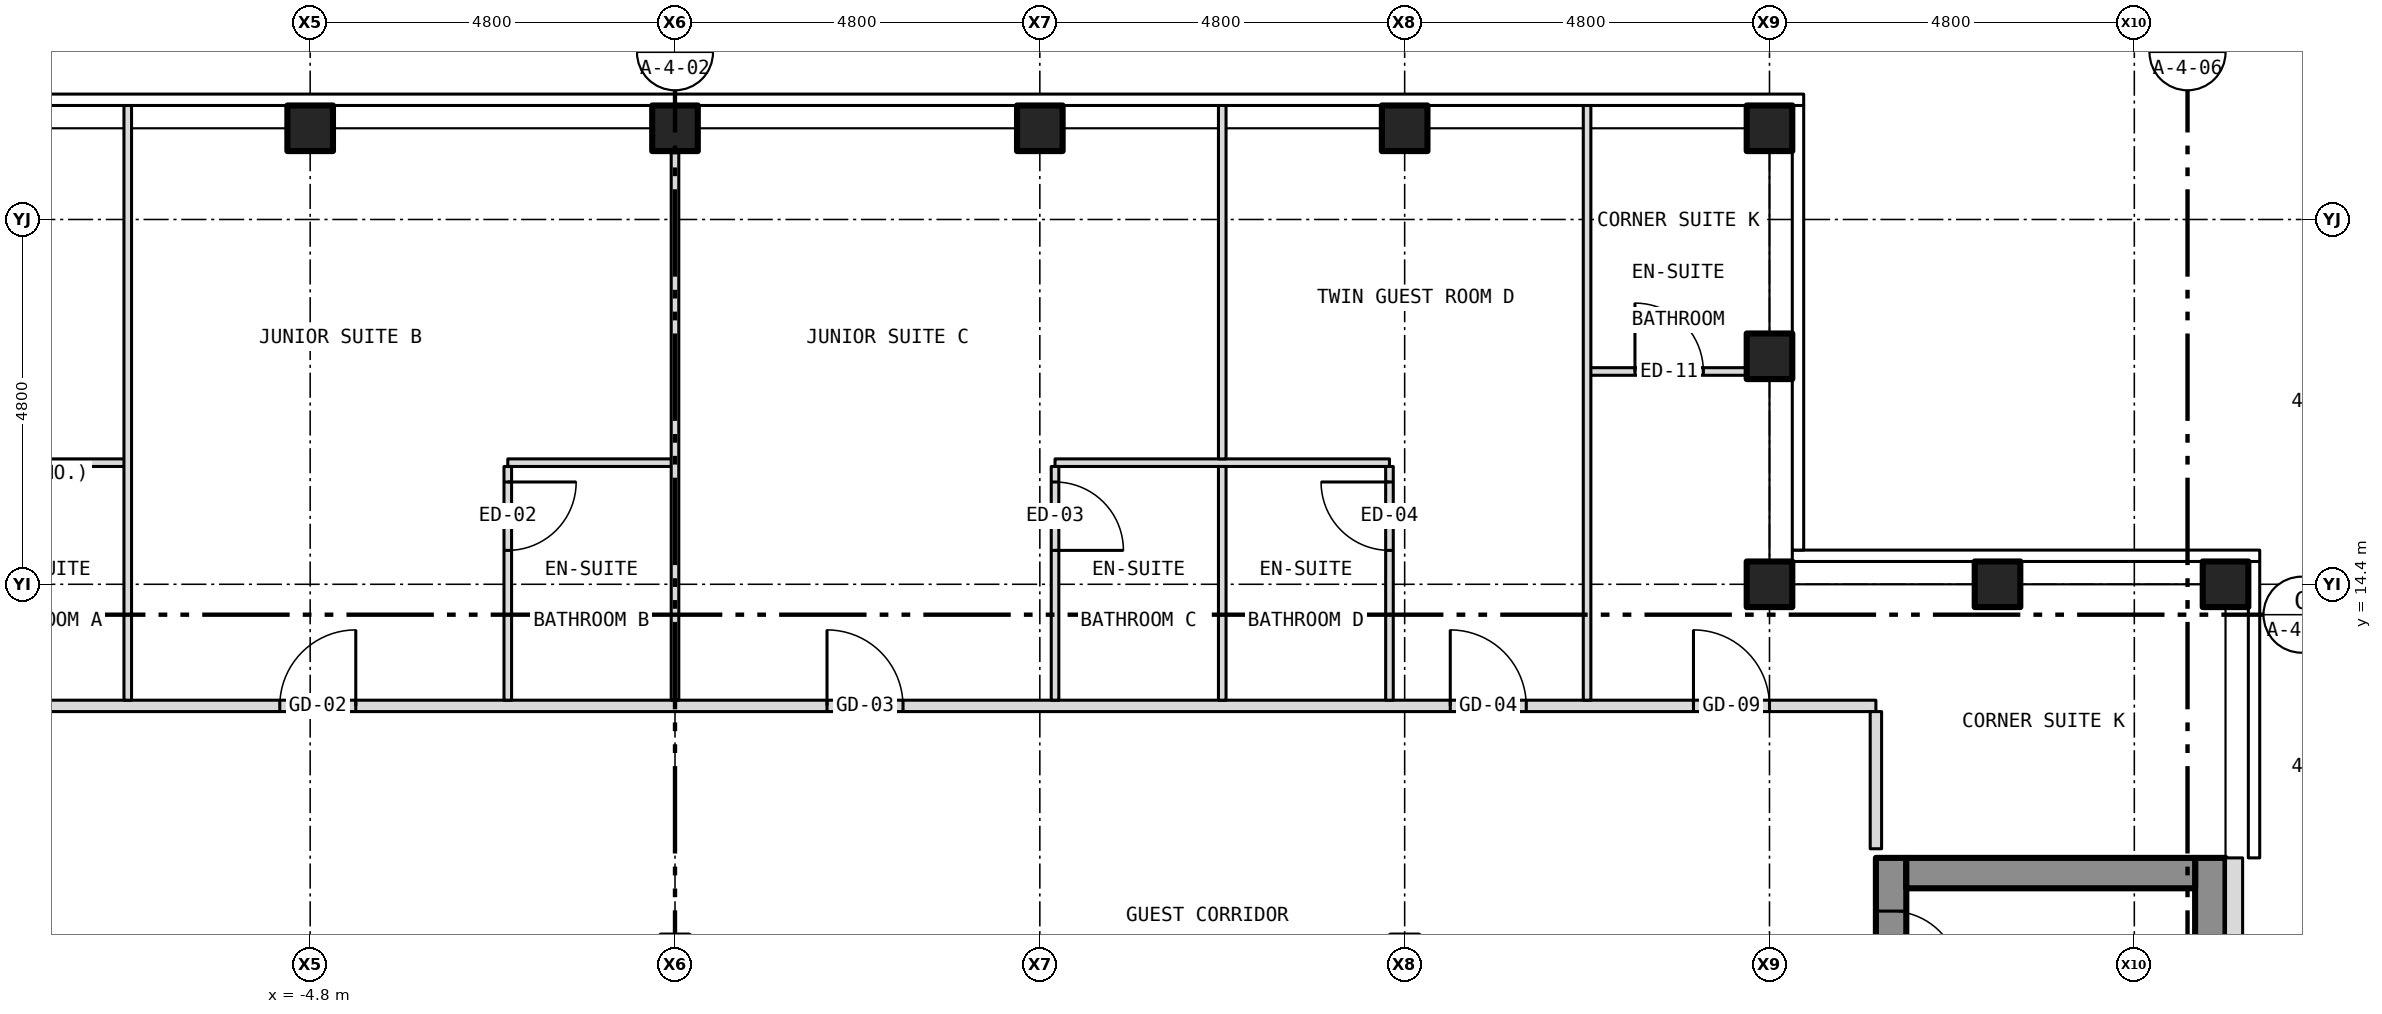
"""IFC4 building model, lengths in metres.
Left out: names, types, materials, properties, quantities, classifications, styles, units other than length and angle.
Written with IfcOpenShell. Run it as: python <this file> out.ifc"""

import sys

from ifc_helpers import new_model, si_unit, direction, frame, frame_2d, origin, origin_2d, place, context, subcontext, project, spatial, rectangle, hollow_rectangle, extrude, element, fill, save


model = new_model("IFC4")
c1 = context("Model", 3, precision=1e-05, world=origin(), true_north=direction((0.0, 1.0)))
c2 = subcontext(c1, "Body", "Model", "MODEL_VIEW")
j1 = project(units=[si_unit("LENGTHUNIT", "METRE"), si_unit("PLANEANGLEUNIT", "RADIAN")], contexts=[c1])
p1 = place(None, origin())
s1 = spatial("IfcSite", under=j1, at=p1, CompositionType="ELEMENT")
p2 = place(p1, origin())
s2 = spatial("IfcBuilding", under=s1, at=p2, CompositionType="ELEMENT")
p3 = place(p2, frame((0.0, 0.0, 258.5)))
s3 = spatial("IfcBuildingStorey", under=s2, at=p3, CompositionType="ELEMENT", Elevation=258.5)
for number, where, z_axis, x_axis in (
    (1, (-4.8, 20.4, -0.15), (0.0, 0.0, 1.0), (1.0, 0.0, 0.0)),
    (2, (0.0, 20.4, -0.15), (0.0, 0.0, 1.0), (1.0, 0.0, 0.0)),
    (3, (4.8, 20.4, -0.15), (0.0, 0.0, 1.0), (1.0, 0.0, 0.0)),
    (4, (9.6, 20.4, -0.15), (0.0, 0.0, 1.0), (1.0, 0.0, 0.0)),
    (5, (14.4, 20.4, -0.15), (0.0, 0.0, 1.0), (1.0, 0.0, 0.0)),
    (6, (20.4, 14.4, -0.15), (0.0, 0.0, 1.0), (1.0, 0.0, 0.0)),
    (7, (14.4, 14.4, -0.15), (0.0, 0.0, 1.0), (1.0, 0.0, 0.0)),
    (8, (14.4, 17.4, -0.15), (0.0, 0.0, 1.0), (1.0, 0.0, 0.0)),
    (9, (17.4, 14.4, -0.15), (0.0, 0.0, 1.0), (1.0, 0.0, 0.0)),
):
    element("IfcColumn", number, at=place(p3, frame(where, z_axis=z_axis, x_axis=x_axis)), inside=s3, PredefinedType="COLUMN", context=c2, shape_type="SweptSolid", body=[
        extrude(hollow_rectangle(XDim=0.6, YDim=0.6, WallThickness=0.03, at=origin_2d()), origin(), (0.0, 0.0, 1.0), 3.5),
    ])
p4 = place(p3, frame((16.0, -10.8, 0.0), z_axis=(0.0, 0.0, 1.0), x_axis=(0.0, 1.0, 0.0)))
e10 = element("IfcWall", 10, at=p4, inside=s3, PredefinedType="SHEAR", context=c2, shape_type="SweptSolid", body=[
    extrude(rectangle(XDim=21.6, YDim=0.4, at=frame_2d((10.8, 0.0))), origin(), (0.0, 0.0, 1.0), 3.25),
])
p5 = place(p4, frame((9.4, 0.0, 0.0)))
e11 = element("IfcOpeningElement", 11, at=p5, cuts=e10, PredefinedType="OPENING", context=c2, shape_type="SweptSolid", body=[
    extrude(rectangle(XDim=1.1, YDim=2.1, at=frame_2d((0.55, 1.05))), frame((0.0, 0.212, 0.0), z_axis=(0.0, -1.0, 0.0), x_axis=(1.0, 0.0, 0.0)), (0.0, 0.0, 1.0), 0.424),
])
p6 = place(p4, frame((11.5, 0.0, 0.0)))
e12 = element("IfcOpeningElement", 12, at=p6, cuts=e10, PredefinedType="OPENING", context=c2, shape_type="SweptSolid", body=[
    extrude(rectangle(XDim=1.1, YDim=2.1, at=frame_2d((0.55, 1.05))), frame((0.0, 0.212, 0.0), z_axis=(0.0, -1.0, 0.0), x_axis=(1.0, 0.0, 0.0)), (0.0, 0.0, 1.0), 0.424),
])
p7 = place(p4, frame((13.6, 0.0, 0.0)))
e13 = element("IfcOpeningElement", 13, at=p7, cuts=e10, PredefinedType="OPENING", context=c2, shape_type="SweptSolid", body=[
    extrude(rectangle(XDim=1.1, YDim=2.1, at=frame_2d((0.55, 1.05))), frame((0.0, 0.212, 0.0), z_axis=(0.0, -1.0, 0.0), x_axis=(1.0, 0.0, 0.0)), (0.0, 0.0, 1.0), 0.424),
])
p8 = place(p4, frame((15.7, 0.0, 0.0)))
e14 = element("IfcOpeningElement", 14, at=p8, cuts=e10, PredefinedType="OPENING", context=c2, shape_type="SweptSolid", body=[
    extrude(rectangle(XDim=1.1, YDim=2.1, at=frame_2d((0.55, 1.05))), frame((0.0, 0.212, 0.0), z_axis=(0.0, -1.0, 0.0), x_axis=(1.0, 0.0, 0.0)), (0.0, 0.0, 1.0), 0.424),
])
p9 = place(p4, frame((17.8, 0.0, 0.0)))
e15 = element("IfcOpeningElement", 15, at=p9, cuts=e10, PredefinedType="OPENING", context=c2, shape_type="SweptSolid", body=[
    extrude(rectangle(XDim=1.1, YDim=2.1, at=frame_2d((0.55, 1.05))), frame((0.0, 0.212, 0.0), z_axis=(0.0, -1.0, 0.0), x_axis=(1.0, 0.0, 0.0)), (0.0, 0.0, 1.0), 0.424),
])
p10 = place(p4, frame((5.642, 0.0, 0.0)))
e16 = element("IfcOpeningElement", 16, at=p10, cuts=e10, PredefinedType="OPENING", context=c2, shape_type="SweptSolid", body=[
    extrude(rectangle(XDim=1.1, YDim=2.1, at=frame_2d((0.55, 1.05))), frame((0.0, 0.212, 0.0), z_axis=(0.0, -1.0, 0.0), x_axis=(1.0, 0.0, 0.0)), (0.0, 0.0, 1.0), 0.424),
])
p11 = place(p4, frame((7.5, 0.0, 0.0)))
e17 = element("IfcOpeningElement", 17, at=p11, cuts=e10, PredefinedType="OPENING", context=c2, shape_type="SweptSolid", body=[
    extrude(rectangle(XDim=1.1, YDim=2.1, at=frame_2d((0.55, 1.05))), frame((0.0, 0.212, 0.0), z_axis=(0.0, -1.0, 0.0), x_axis=(1.0, 0.0, 0.0)), (0.0, 0.0, 1.0), 0.424),
])
p12 = place(p4, frame((20.0, 0.0, 0.0)))
e18 = element("IfcOpeningElement", 18, at=p12, cuts=e10, PredefinedType="OPENING", context=c2, shape_type="SweptSolid", body=[
    extrude(rectangle(XDim=0.9, YDim=2.1, at=frame_2d((0.45, 1.05))), frame((0.0, 0.212, 0.0), z_axis=(0.0, -1.0, 0.0), x_axis=(1.0, 0.0, 0.0)), (0.0, 0.0, 1.0), 0.424),
])
p13 = place(p3, frame((20.2, -10.8, 0.0), z_axis=(0.0, 0.0, 1.0), x_axis=(0.0, 1.0, 0.0)))
e19 = element("IfcWall", 19, at=p13, inside=s3, PredefinedType="SHEAR", context=c2, shape_type="SweptSolid", body=[
    extrude(rectangle(XDim=21.6, YDim=0.4, at=frame_2d((10.8, 0.0))), origin(), (0.0, 0.0, 1.0), 3.25),
])
p14 = place(p3, frame((16.2, 10.6, 0.0), z_axis=(0.0, 0.0, 1.0), x_axis=(1.0, 0.0, 0.0)))
e20 = element("IfcWall", 20, at=p14, inside=s3, PredefinedType="SHEAR", context=c2, shape_type="SweptSolid", body=[
    extrude(rectangle(XDim=3.8, YDim=0.4, at=frame_2d((1.9, 0.0))), origin(), (0.0, 0.0, 1.0), 3.25),
])
p15 = place(p3, frame((20.512, -10.8, 0.0), z_axis=(0.0, 0.0, 1.0), x_axis=(0.0, 1.0, 0.0)))
e21 = element("IfcWall", 21, at=p15, inside=s3, PredefinedType="SOLIDWALL", context=c2, shape_type="SweptSolid", body=[
    extrude(rectangle(XDim=21.6, YDim=0.225, at=frame_2d((10.8, 0.0))), origin(), (0.0, 0.0, 1.0), 3.5),
])
p16 = place(p15, frame((2.95, 0.0, 1.0)))
e22 = element("IfcOpeningElement", 22, at=p16, cuts=e21, PredefinedType="OPENING", context=c2, shape_type="SweptSolid", body=[
    extrude(rectangle(XDim=0.6, YDim=1.5, at=frame_2d((0.3, 0.75))), frame((0.0, 0.125, 0.0), z_axis=(0.0, -1.0, 0.0), x_axis=(1.0, 0.0, 0.0)), (0.0, 0.0, 1.0), 0.249),
])
p17 = place(p3, frame((-15.8, 12.8, 0.0), z_axis=(0.0, 0.0, 1.0), x_axis=(1.0, 0.0, 0.0)))
e23 = element("IfcWall", 23, at=p17, inside=s3, PredefinedType="PARTITIONING", context=c2, shape_type="SweptSolid", body=[
    extrude(rectangle(XDim=31.6, YDim=0.15, at=frame_2d((15.8, 0.0))), origin(), (0.0, 0.0, 1.0), 3.35),
])
p18 = place(p17, frame((4.6, 0.0, 0.0)))
e24 = element("IfcOpeningElement", 24, at=p18, cuts=e23, PredefinedType="OPENING", context=c2, shape_type="SweptSolid", body=[
    extrude(rectangle(XDim=1.0, YDim=2.1, at=frame_2d((0.5, 1.05))), frame((0.0, 0.087, 0.0), z_axis=(0.0, -1.0, 0.0), x_axis=(1.0, 0.0, 0.0)), (0.0, 0.0, 1.0), 0.174),
])
p19 = place(p17, frame((10.6, 0.0, 0.0)))
e25 = element("IfcOpeningElement", 25, at=p19, cuts=e23, PredefinedType="OPENING", context=c2, shape_type="SweptSolid", body=[
    extrude(rectangle(XDim=1.0, YDim=2.1, at=frame_2d((0.5, 1.05))), frame((0.0, 0.087, 0.0), z_axis=(0.0, -1.0, 0.0), x_axis=(1.0, 0.0, 0.0)), (0.0, 0.0, 1.0), 0.174),
])
p20 = place(p17, frame((17.8, 0.0, 0.0)))
e26 = element("IfcOpeningElement", 26, at=p20, cuts=e23, PredefinedType="OPENING", context=c2, shape_type="SweptSolid", body=[
    extrude(rectangle(XDim=1.0, YDim=2.1, at=frame_2d((0.5, 1.05))), frame((0.0, 0.087, 0.0), z_axis=(0.0, -1.0, 0.0), x_axis=(1.0, 0.0, 0.0)), (0.0, 0.0, 1.0), 0.174),
])
p21 = place(p17, frame((26.0, 0.0, 0.0)))
e27 = element("IfcOpeningElement", 27, at=p21, cuts=e23, PredefinedType="OPENING", context=c2, shape_type="SweptSolid", body=[
    extrude(rectangle(XDim=1.0, YDim=2.1, at=frame_2d((0.5, 1.05))), frame((0.0, 0.087, 0.0), z_axis=(0.0, -1.0, 0.0), x_axis=(1.0, 0.0, 0.0)), (0.0, 0.0, 1.0), 0.174),
])
p22 = place(p17, frame((1.4, 0.0, 0.0)))
e28 = element("IfcOpeningElement", 28, at=p22, cuts=e23, PredefinedType="OPENING", context=c2, shape_type="SweptSolid", body=[
    extrude(rectangle(XDim=1.0, YDim=2.1, at=frame_2d((0.5, 1.05))), frame((0.0, 0.087, 0.0), z_axis=(0.0, -1.0, 0.0), x_axis=(1.0, 0.0, 0.0)), (0.0, 0.0, 1.0), 0.174),
])
p23 = place(p17, frame((29.2, 0.0, 0.0)))
e29 = element("IfcOpeningElement", 29, at=p23, cuts=e23, PredefinedType="OPENING", context=c2, shape_type="SweptSolid", body=[
    extrude(rectangle(XDim=1.0, YDim=2.1, at=frame_2d((0.5, 1.05))), frame((0.0, 0.087, 0.0), z_axis=(0.0, -1.0, 0.0), x_axis=(1.0, 0.0, 0.0)), (0.0, 0.0, 1.0), 0.174),
])
for number, where, z_axis, x_axis in (
    (30, (-9.4, 16.0, 0.0), (0.0, 0.0, 1.0), (1.0, 0.0, 0.0)),
    (31, (-2.2, 16.0, 0.0), (0.0, 0.0, 1.0), (1.0, 0.0, 0.0)),
):
    element("IfcWall", number, at=place(p3, frame(where, z_axis=z_axis, x_axis=x_axis)), inside=s3, PredefinedType="PARTITIONING", context=c2, shape_type="SweptSolid", body=[
        extrude(rectangle(XDim=2.2, YDim=0.1, at=frame_2d((1.1, 0.0))), origin(), (0.0, 0.0, 1.0), 3.35),
    ])
p24 = place(p3, frame((5.0, 16.0, 0.0), z_axis=(0.0, 0.0, 1.0), x_axis=(1.0, 0.0, 0.0)))
e32 = element("IfcWall", 32, at=p24, inside=s3, PredefinedType="PARTITIONING", context=c2, shape_type="SweptSolid", body=[
    extrude(rectangle(XDim=4.4, YDim=0.1, at=frame_2d((2.2, 0.0))), origin(), (0.0, 0.0, 1.0), 3.35),
])
p25 = place(p3, frame((12.0, 17.2, 0.0), z_axis=(0.0, 0.0, 1.0), x_axis=(1.0, 0.0, 0.0)))
e33 = element("IfcWall", 33, at=p25, inside=s3, PredefinedType="PARTITIONING", context=c2, shape_type="SweptSolid", body=[
    extrude(rectangle(XDim=2.28, YDim=0.1, at=frame_2d((1.14, 0.0))), origin(), (0.0, 0.0, 1.0), 3.35),
])
p26 = place(p25, frame((0.63, 0.0, 0.0)))
e34 = element("IfcOpeningElement", 34, at=p26, cuts=e33, PredefinedType="OPENING", context=c2, shape_type="SweptSolid", body=[
    extrude(rectangle(XDim=0.9, YDim=2.1, at=frame_2d((0.45, 1.05))), frame((0.0, 0.062, 0.0), z_axis=(0.0, -1.0, 0.0), x_axis=(1.0, 0.0, 0.0)), (0.0, 0.0, 1.0), 0.124),
])
p27 = place(p3, frame((-7.2, 12.875, 0.0), z_axis=(0.0, 0.0, 1.0), x_axis=(0.0, 1.0, 0.0)))
e35 = element("IfcWall", 35, at=p27, inside=s3, PredefinedType="PARTITIONING", context=c2, shape_type="SweptSolid", body=[
    extrude(rectangle(XDim=7.855, YDim=0.1, at=frame_2d((3.927, 0.0))), origin(), (0.0, 0.0, 1.0), 3.35),
])
p28 = place(p3, frame((-2.2, 12.875, 0.0), z_axis=(0.0, 0.0, 1.0), x_axis=(0.0, 1.0, 0.0)))
e36 = element("IfcWall", 36, at=p28, inside=s3, PredefinedType="PARTITIONING", context=c2, shape_type="SweptSolid", body=[
    extrude(rectangle(XDim=3.075, YDim=0.1, at=frame_2d((1.538, 0.0))), origin(), (0.0, 0.0, 1.0), 3.35),
])
p29 = place(p28, frame((1.971, 0.0, 0.0)))
e37 = element("IfcOpeningElement", 37, at=p29, cuts=e36, PredefinedType="OPENING", context=c2, shape_type="SweptSolid", body=[
    extrude(rectangle(XDim=0.9, YDim=2.1, at=frame_2d((0.45, 1.05))), frame((0.0, 0.062, 0.0), z_axis=(0.0, -1.0, 0.0), x_axis=(1.0, 0.0, 0.0)), (0.0, 0.0, 1.0), 0.124),
])
p30 = place(p3, frame((0.0, 12.875, 0.0), z_axis=(0.0, 0.0, 1.0), x_axis=(0.0, 1.0, 0.0)))
e38 = element("IfcWall", 38, at=p30, inside=s3, PredefinedType="PARTITIONING", context=c2, shape_type="SweptSolid", body=[
    extrude(rectangle(XDim=7.405, YDim=0.1, at=frame_2d((3.703, 0.0))), origin(), (0.0, 0.0, 1.0), 2.728),
])
p31 = place(p3, frame((5.0, 12.875, 0.0), z_axis=(0.0, 0.0, 1.0), x_axis=(0.0, 1.0, 0.0)))
e39 = element("IfcWall", 39, at=p31, inside=s3, PredefinedType="PARTITIONING", context=c2, shape_type="SweptSolid", body=[
    extrude(rectangle(XDim=3.075, YDim=0.1, at=frame_2d((1.538, 0.0))), origin(), (0.0, 0.0, 1.0), 3.35),
])
p32 = place(p31, frame((1.971, 0.0, 0.0)))
e40 = element("IfcOpeningElement", 40, at=p32, cuts=e39, PredefinedType="OPENING", context=c2, shape_type="SweptSolid", body=[
    extrude(rectangle(XDim=0.9, YDim=2.1, at=frame_2d((0.45, 1.05))), frame((0.0, 0.062, 0.0), z_axis=(0.0, -1.0, 0.0), x_axis=(1.0, 0.0, 0.0)), (0.0, 0.0, 1.0), 0.124),
])
p33 = place(p3, frame((7.2, 12.875, 0.0), z_axis=(0.0, 0.0, 1.0), x_axis=(0.0, 1.0, 0.0)))
e41 = element("IfcWall", 41, at=p33, inside=s3, PredefinedType="PARTITIONING", context=c2, shape_type="SweptSolid", body=[
    extrude(rectangle(XDim=3.075, YDim=0.1, at=frame_2d((1.538, 0.0))), origin(), (0.0, 0.0, 1.0), 3.35),
])
p34 = place(p3, frame((7.2, 16.05, 0.0), z_axis=(0.0, 0.0, 1.0), x_axis=(0.0, 1.0, 0.0)))
e42 = element("IfcWall", 42, at=p34, inside=s3, PredefinedType="PARTITIONING", context=c2, shape_type="SweptSolid", body=[
    extrude(rectangle(XDim=4.68, YDim=0.1, at=frame_2d((2.34, 0.0))), origin(), (0.0, 0.0, 1.0), 3.35),
])
p35 = place(p3, frame((9.4, 12.875, 0.0), z_axis=(0.0, 0.0, 1.0), x_axis=(0.0, 1.0, 0.0)))
e43 = element("IfcWall", 43, at=p35, inside=s3, PredefinedType="PARTITIONING", context=c2, shape_type="SweptSolid", body=[
    extrude(rectangle(XDim=3.075, YDim=0.1, at=frame_2d((1.538, 0.0))), origin(), (0.0, 0.0, 1.0), 2.728),
])
p36 = place(p35, frame((1.971, 0.0, 0.0)))
e44 = element("IfcOpeningElement", 44, at=p36, cuts=e43, PredefinedType="OPENING", context=c2, shape_type="SweptSolid", body=[
    extrude(rectangle(XDim=0.9, YDim=2.1, at=frame_2d((0.45, 1.05))), frame((0.0, 0.062, 0.0), z_axis=(0.0, -1.0, 0.0), x_axis=(1.0, 0.0, 0.0)), (0.0, 0.0, 1.0), 0.124),
])
p37 = place(p3, frame((12.0, 12.875, 0.0), z_axis=(0.0, 0.0, 1.0), x_axis=(0.0, 1.0, 0.0)))
e45 = element("IfcWall", 45, at=p37, inside=s3, PredefinedType="PARTITIONING", context=c2, shape_type="SweptSolid", body=[
    extrude(rectangle(XDim=7.855, YDim=0.1, at=frame_2d((3.927, 0.0))), origin(), (0.0, 0.0, 1.0), 3.35),
])
p38 = place(p3, frame((15.8, 10.92, 0.0), z_axis=(0.0, 0.0, 1.0), x_axis=(0.0, 1.0, 0.0)))
e46 = element("IfcWall", 46, at=p38, inside=s3, PredefinedType="PARTITIONING", context=c2, shape_type="SweptSolid", body=[
    extrude(rectangle(XDim=1.805, YDim=0.15, at=frame_2d((0.903, 0.0))), origin(), (0.0, 0.0, 1.0), 3.35),
])
p39 = place(p12, origin())
e47 = element("IfcDoor", 47, at=p39, inside=s3, OperationType="SINGLE_SWING_LEFT", PredefinedType="DOOR", context=c2, shape_type="SweptSolid", body=[
    extrude(rectangle(XDim=0.9, YDim=2.1, at=frame_2d((0.45, 1.05))), frame((0.0, 0.025, 0.0), z_axis=(0.0, -1.0, 0.0), x_axis=(1.0, 0.0, 0.0)), (0.0, 0.0, 1.0), 0.05),
])
fill(e18, e47)
p40 = place(p19, origin())
e48 = element("IfcDoor", 48, at=p40, inside=s3, OperationType="SINGLE_SWING_RIGHT", PredefinedType="DOOR", context=c2, shape_type="SweptSolid", body=[
    extrude(rectangle(XDim=1.0, YDim=2.1, at=frame_2d((0.5, 1.05))), frame((0.0, 0.025, 0.0), z_axis=(0.0, -1.0, 0.0), x_axis=(1.0, 0.0, 0.0)), (0.0, 0.0, 1.0), 0.05),
])
fill(e25, e48)
p41 = place(p29, origin())
e49 = element("IfcDoor", 49, at=p41, inside=s3, OperationType="SINGLE_SWING_RIGHT", PredefinedType="DOOR", context=c2, shape_type="SweptSolid", body=[
    extrude(rectangle(XDim=0.9, YDim=2.1, at=frame_2d((0.45, 1.05))), frame((0.0, 0.025, 0.0), z_axis=(0.0, -1.0, 0.0), x_axis=(1.0, 0.0, 0.0)), (0.0, 0.0, 1.0), 0.05),
])
fill(e37, e49)
p42 = place(p20, origin())
e50 = element("IfcDoor", 50, at=p42, inside=s3, OperationType="SINGLE_SWING_LEFT", PredefinedType="DOOR", context=c2, shape_type="SweptSolid", body=[
    extrude(rectangle(XDim=1.0, YDim=2.1, at=frame_2d((0.5, 1.05))), frame((0.0, 0.025, 0.0), z_axis=(0.0, -1.0, 0.0), x_axis=(1.0, 0.0, 0.0)), (0.0, 0.0, 1.0), 0.05),
])
fill(e26, e50)
p43 = place(p32, origin())
e51 = element("IfcDoor", 51, at=p43, inside=s3, OperationType="SINGLE_SWING_LEFT", PredefinedType="DOOR", context=c2, shape_type="SweptSolid", body=[
    extrude(rectangle(XDim=0.9, YDim=2.1, at=frame_2d((0.45, 1.05))), frame((0.0, 0.025, 0.0), z_axis=(0.0, -1.0, 0.0), x_axis=(1.0, 0.0, 0.0)), (0.0, 0.0, 1.0), 0.05),
])
fill(e40, e51)
p44 = place(p21, origin())
e52 = element("IfcDoor", 52, at=p44, inside=s3, OperationType="SINGLE_SWING_LEFT", PredefinedType="DOOR", context=c2, shape_type="SweptSolid", body=[
    extrude(rectangle(XDim=1.0, YDim=2.1, at=frame_2d((0.5, 1.05))), frame((0.0, 0.025, 0.0), z_axis=(0.0, -1.0, 0.0), x_axis=(1.0, 0.0, 0.0)), (0.0, 0.0, 1.0), 0.05),
])
fill(e27, e52)
p45 = place(p36, origin())
e53 = element("IfcDoor", 53, at=p45, inside=s3, OperationType="SINGLE_SWING_RIGHT", PredefinedType="DOOR", context=c2, shape_type="SweptSolid", body=[
    extrude(rectangle(XDim=0.9, YDim=2.1, at=frame_2d((0.45, 1.05))), frame((0.0, 0.025, 0.0), z_axis=(0.0, -1.0, 0.0), x_axis=(1.0, 0.0, 0.0)), (0.0, 0.0, 1.0), 0.05),
])
fill(e44, e53)
p46 = place(p26, origin())
e54 = element("IfcDoor", 54, at=p46, inside=s3, OperationType="SINGLE_SWING_LEFT", PredefinedType="DOOR", context=c2, shape_type="SweptSolid", body=[
    extrude(rectangle(XDim=0.9, YDim=2.1, at=frame_2d((0.45, 1.05))), frame((0.0, 0.025, 0.0), z_axis=(0.0, -1.0, 0.0), x_axis=(1.0, 0.0, 0.0)), (0.0, 0.0, 1.0), 0.05),
])
fill(e34, e54)
p47 = place(p23, origin())
e55 = element("IfcDoor", 55, at=p47, inside=s3, OperationType="SINGLE_SWING_LEFT", PredefinedType="DOOR", context=c2, shape_type="SweptSolid", body=[
    extrude(rectangle(XDim=1.0, YDim=2.1, at=frame_2d((0.5, 1.05))), frame((0.0, 0.025, 0.0), z_axis=(0.0, -1.0, 0.0), x_axis=(1.0, 0.0, 0.0)), (0.0, 0.0, 1.0), 0.05),
])
fill(e29, e55)
save(model, sys.argv[1])
